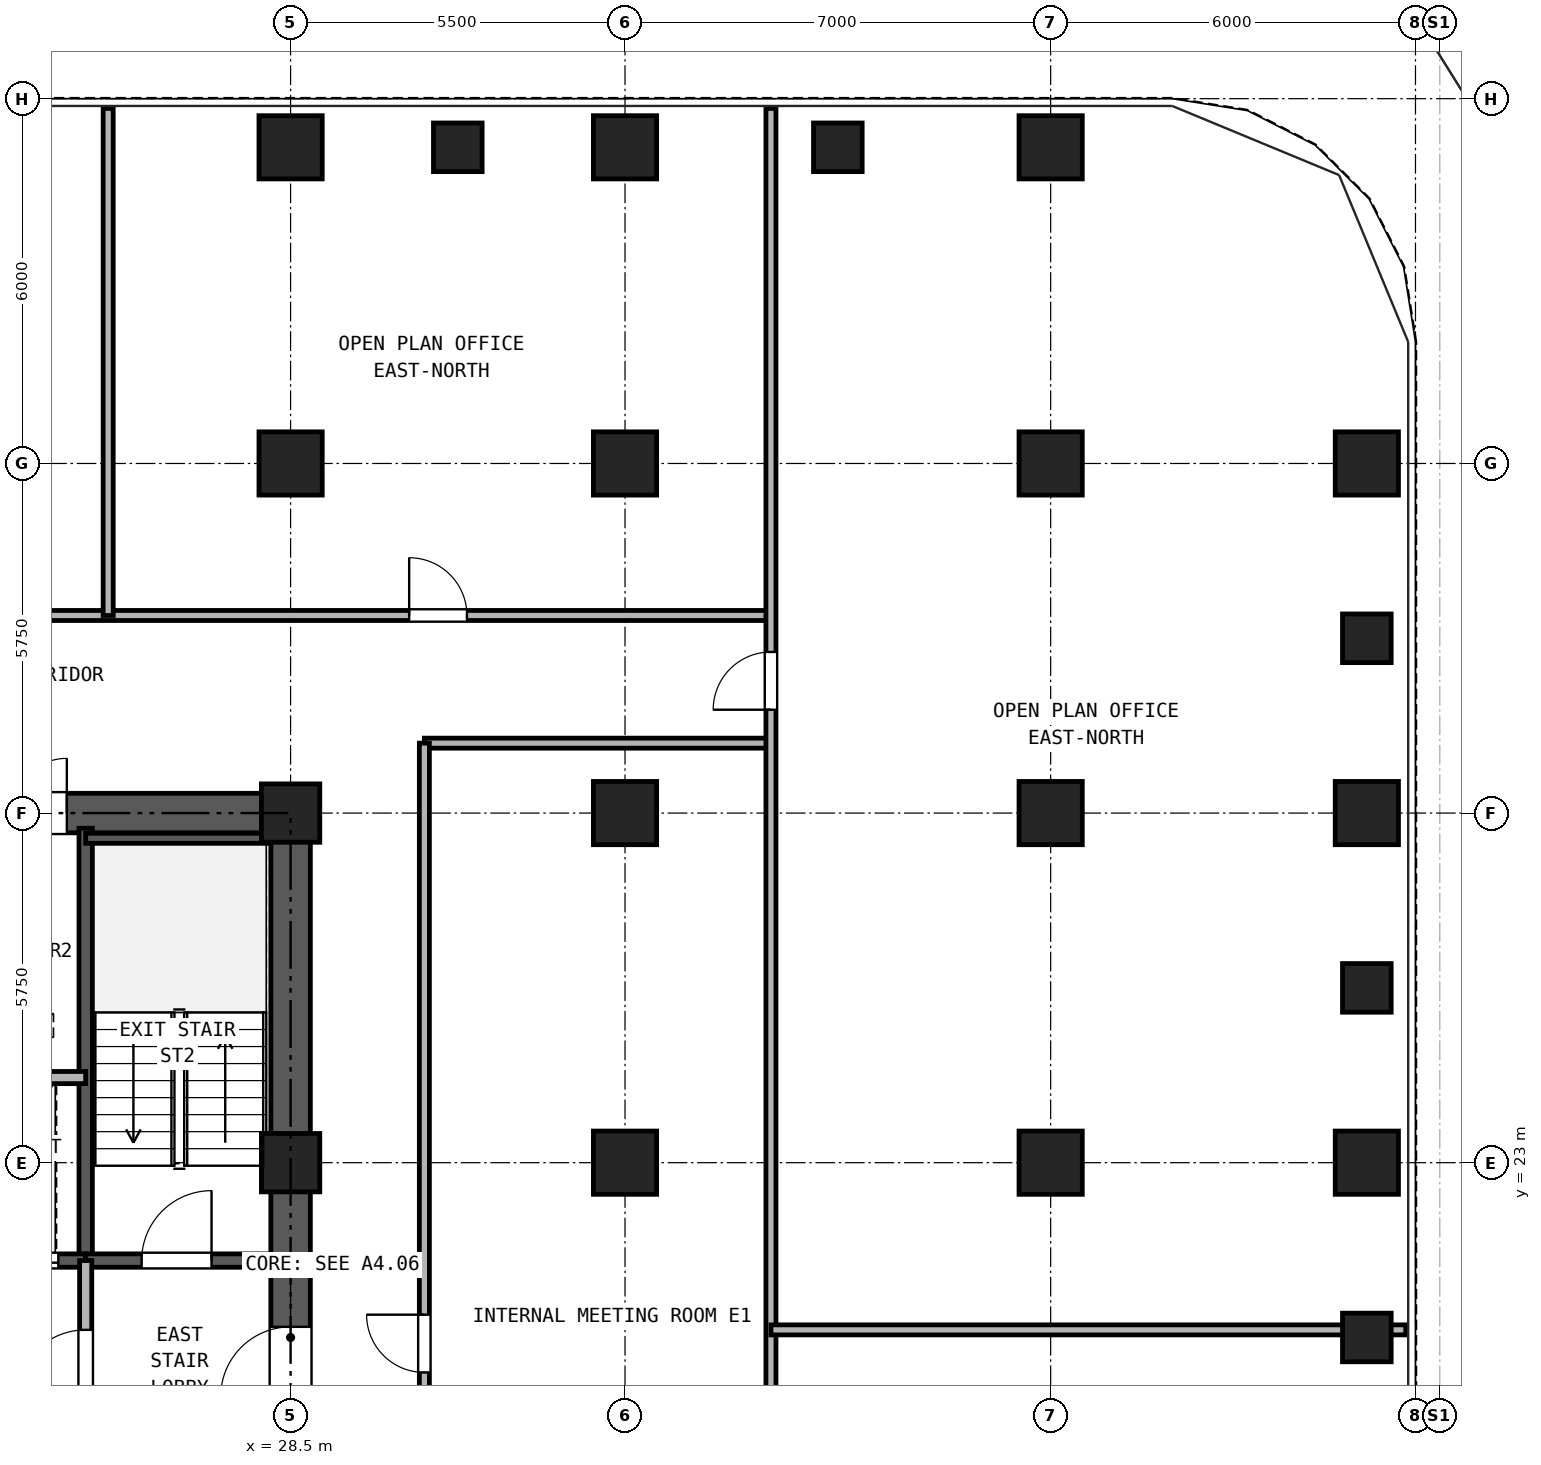
"""IFC4 building model, lengths in metres.
Left out: names, types, materials, properties, quantities, classifications, styles, units other than length and angle.
Written with IfcOpenShell. Run it as: python <this file> out.ifc"""

import sys

from ifc_helpers import new_model, si_unit, direction, frame, frame_2d, origin, origin_2d, place, context, subcontext, project, spatial, rectangle, hollow_rectangle, extrude, source, transform, mapped, element, fill, save


model = new_model("IFC4")
c1 = context("Model", 3, precision=1e-05, world=origin(), true_north=direction((0.0, 1.0)))
c2 = subcontext(c1, "Body", "Model", "MODEL_VIEW")
j1 = project(units=[si_unit("LENGTHUNIT", "METRE"), si_unit("PLANEANGLEUNIT", "RADIAN")], contexts=[c1])
p1 = place(None, origin())
s1 = spatial("IfcSite", under=j1, at=p1, CompositionType="ELEMENT")
p2 = place(p1, origin())
s2 = spatial("IfcBuilding", under=s1, at=p2, CompositionType="ELEMENT")
p3 = place(p2, frame((0.0, 0.0, 47.7)))
s3 = spatial("IfcBuildingStorey", under=s2, at=p3, CompositionType="ELEMENT", Elevation=47.7)
m1 = source(origin(), c2, "Body", "SweptSolid", [
    extrude(hollow_rectangle(XDim=1.04, YDim=1.04, WallThickness=0.065, at=origin_2d()), origin(), (0.0, 0.0, 1.0), 3.32),
])
for number, where, z_axis, x_axis in (
    (1, (28.5, 39.7, 0.0), (0.0, 0.0, 1.0), (1.0, 0.0, 0.0)),
    (2, (34.0, 39.7, 0.0), (0.0, 0.0, 1.0), (1.0, 0.0, 0.0)),
    (3, (41.0, 39.7, 0.0), (0.0, 0.0, 1.0), (1.0, 0.0, 0.0)),
    (4, (46.2, 23.0, 0.0), (0.0, 0.0, 1.0), (1.0, 0.0, 0.0)),
    (5, (46.2, 28.75, 0.0), (0.0, 0.0, 1.0), (1.0, 0.0, 0.0)),
    (6, (46.2, 34.5, 0.0), (0.0, 0.0, 1.0), (1.0, 0.0, 0.0)),
):
    element("IfcColumn", number, at=place(p3, frame(where, z_axis=z_axis, x_axis=x_axis)), inside=s3, PredefinedType="COLUMN", context=c2, shape_type="MappedRepresentation", body=[
        mapped(m1, transform((0.0, 0.0, 0.0), x_axis=(1.0, 0.0, 0.0), y_axis=(0.0, 1.0, 0.0), z_axis=(0.0, 0.0, 1.0), scale=1.0)),
    ])
m2 = source(origin(), c2, "Body", "SweptSolid", [
    extrude(hollow_rectangle(XDim=0.96, YDim=0.96, WallThickness=0.06, at=origin_2d()), origin(), (0.0, 0.0, 1.0), 3.32),
])
for number, where, z_axis, x_axis in (
    (7, (28.5, 23.0, 0.0), (0.0, 0.0, 1.0), (1.0, 0.0, 0.0)),
    (8, (28.5, 28.75, 0.0), (0.0, 0.0, 1.0), (1.0, 0.0, 0.0)),
):
    element("IfcColumn", number, at=place(p3, frame(where, z_axis=z_axis, x_axis=x_axis)), inside=s3, PredefinedType="COLUMN", context=c2, shape_type="MappedRepresentation", body=[
        mapped(m2, transform((0.0, 0.0, 0.0), x_axis=(1.0, 0.0, 0.0), y_axis=(0.0, 1.0, 0.0), z_axis=(0.0, 0.0, 1.0), scale=1.0)),
    ])
for number, where, z_axis, x_axis in (
    (9, (28.5, 34.5, 0.0), (0.0, 0.0, 1.0), (1.0, 0.0, 0.0)),
    (10, (34.0, 23.0, 0.0), (0.0, 0.0, 1.0), (1.0, 0.0, 0.0)),
    (11, (34.0, 28.75, 0.0), (0.0, 0.0, 1.0), (1.0, 0.0, 0.0)),
    (12, (34.0, 34.5, 0.0), (0.0, 0.0, 1.0), (1.0, 0.0, 0.0)),
    (13, (41.0, 23.0, 0.0), (0.0, 0.0, 1.0), (1.0, 0.0, 0.0)),
    (14, (41.0, 28.75, 0.0), (0.0, 0.0, 1.0), (1.0, 0.0, 0.0)),
    (15, (41.0, 34.5, 0.0), (0.0, 0.0, 1.0), (1.0, 0.0, 0.0)),
):
    element("IfcColumn", number, at=place(p3, frame(where, z_axis=z_axis, x_axis=x_axis)), inside=s3, PredefinedType="COLUMN", context=c2, shape_type="MappedRepresentation", body=[
        mapped(m1, transform((0.0, 0.0, 0.0), x_axis=(1.0, 0.0, 0.0), y_axis=(0.0, 1.0, 0.0), z_axis=(0.0, 0.0, 1.0), scale=1.0)),
    ])
m3 = source(origin(), c2, "Body", "SweptSolid", [
    extrude(hollow_rectangle(XDim=0.8, YDim=0.8, WallThickness=0.045, at=origin_2d()), origin(), (0.0, 0.0, 1.0), 3.32),
])
for number, where, z_axis, x_axis in (
    (16, (31.25, 39.7, 0.0), (0.0, 0.0, 1.0), (1.0, 0.0, 0.0)),
    (17, (37.5, 39.7, 0.0), (0.0, 0.0, 1.0), (1.0, 0.0, 0.0)),
    (18, (46.2, 20.125, 0.0), (0.0, 0.0, 1.0), (1.0, 0.0, 0.0)),
    (19, (46.2, 25.875, 0.0), (0.0, 0.0, 1.0), (1.0, 0.0, 0.0)),
    (20, (46.2, 31.625, 0.0), (0.0, 0.0, 1.0), (1.0, 0.0, 0.0)),
):
    element("IfcColumn", number, at=place(p3, frame(where, z_axis=z_axis, x_axis=x_axis)), inside=s3, PredefinedType="COLUMN", context=c2, shape_type="MappedRepresentation", body=[
        mapped(m3, transform((0.0, 0.0, 0.0), x_axis=(1.0, 0.0, 0.0), y_axis=(0.0, 1.0, 0.0), z_axis=(0.0, 0.0, 1.0), scale=1.0)),
    ])
p4 = place(p3, frame((18.175, 28.75, 0.0), z_axis=(0.0, 0.0, 1.0), x_axis=(1.0, 0.0, 0.0)))
e21 = element("IfcWall", 21, at=p4, inside=s3, PredefinedType="SHEAR", context=c2, shape_type="SweptSolid", body=[
    extrude(rectangle(XDim=10.65, YDim=0.65, at=frame_2d((5.325, 0.0))), origin(), (0.0, 0.0, 1.0), 3.32),
])
p5 = place(p4, frame((4.205, 0.0, 0.0)))
e22 = element("IfcOpeningElement", 22, at=p5, cuts=e21, PredefinedType="OPENING", context=c2, shape_type="SweptSolid", body=[
    extrude(rectangle(XDim=0.9, YDim=2.05, at=frame_2d((0.45, 1.025))), frame((0.0, 0.335, 0.0), z_axis=(0.0, -1.0, 0.0), x_axis=(1.0, 0.0, 0.0)), (0.0, 0.0, 1.0), 0.67),
])
p6 = place(p4, frame((5.745, 0.0, 0.0)))
e23 = element("IfcOpeningElement", 23, at=p6, cuts=e21, PredefinedType="OPENING", context=c2, shape_type="SweptSolid", body=[
    extrude(rectangle(XDim=0.9, YDim=2.05, at=frame_2d((0.45, 1.025))), frame((0.0, 0.335, 0.0), z_axis=(0.0, -1.0, 0.0), x_axis=(1.0, 0.0, 0.0)), (0.0, 0.0, 1.0), 0.67),
])
p7 = place(p3, frame((28.5, 11.825, 0.0), z_axis=(0.0, 0.0, 1.0), x_axis=(0.0, 1.0, 0.0)))
e24 = element("IfcWall", 24, at=p7, inside=s3, PredefinedType="SHEAR", context=c2, shape_type="SweptSolid", body=[
    extrude(rectangle(XDim=16.6, YDim=0.65, at=frame_2d((8.3, 0.0))), origin(), (0.0, 0.0, 1.0), 3.32),
])
p8 = place(p7, frame((7.325, 0.0, 0.0)))
e25 = element("IfcOpeningElement", 25, at=p8, cuts=e24, PredefinedType="OPENING", context=c2, shape_type="SweptSolid", body=[
    extrude(rectangle(XDim=1.15, YDim=2.2, at=frame_2d((0.575, 1.1))), frame((0.0, 0.335, 0.0), z_axis=(0.0, -1.0, 0.0), x_axis=(1.0, 0.0, 0.0)), (0.0, 0.0, 1.0), 0.67),
])
p9 = place(p3, frame((25.13, 21.39, 0.0), z_axis=(0.0, 0.0, 1.0), x_axis=(0.0, 1.0, 0.0)))
e26 = element("IfcWall", 26, at=p9, inside=s3, PredefinedType="SOLIDWALL", context=c2, shape_type="SweptSolid", body=[
    extrude(rectangle(XDim=7.11, YDim=0.22, at=frame_2d((3.555, 0.0))), origin(), (0.0, 0.0, 1.0), 3.32),
])
p10 = place(p3, frame((25.13, 28.335, 0.0), z_axis=(0.0, 0.0, 1.0), x_axis=(1.0, 0.0, 0.0)))
e27 = element("IfcWall", 27, at=p10, inside=s3, PredefinedType="PARTITIONING", context=c2, shape_type="SweptSolid", body=[
    extrude(rectangle(XDim=3.035, YDim=0.165, at=frame_2d((1.518, 0.0))), origin(), (0.0, 0.0, 1.0), 3.32),
])
p11 = place(p3, frame((18.835, 21.39, 0.0), z_axis=(0.0, 0.0, 1.0), x_axis=(1.0, 0.0, 0.0)))
e28 = element("IfcWall", 28, at=p11, inside=s3, PredefinedType="SOLIDWALL", context=c2, shape_type="SweptSolid", body=[
    extrude(rectangle(XDim=6.295, YDim=0.22, at=frame_2d((3.147, 0.0))), origin(), (0.0, 0.0, 1.0), 3.32),
])
p12 = place(p11, frame((1.015, 0.0, 0.0)))
e29 = element("IfcOpeningElement", 29, at=p12, cuts=e28, PredefinedType="OPENING", context=c2, shape_type="SweptSolid", body=[
    extrude(rectangle(XDim=1.15, YDim=2.2, at=frame_2d((0.575, 1.1))), frame((0.0, 0.12, 0.0), z_axis=(0.0, -1.0, 0.0), x_axis=(1.0, 0.0, 0.0)), (0.0, 0.0, 1.0), 0.24),
])
p13 = place(p11, frame((4.745, 0.0, 0.0)))
e30 = element("IfcOpeningElement", 30, at=p13, cuts=e28, PredefinedType="OPENING", context=c2, shape_type="SweptSolid", body=[
    extrude(rectangle(XDim=1.1, YDim=2.25, at=frame_2d((0.55, 1.125))), frame((0.0, 0.12, 0.0), z_axis=(0.0, -1.0, 0.0), x_axis=(1.0, 0.0, 0.0)), (0.0, 0.0, 1.0), 0.24),
])
p14 = place(p3, frame((25.13, 21.39, 0.0), z_axis=(0.0, 0.0, 1.0), x_axis=(1.0, 0.0, 0.0)))
e31 = element("IfcWall", 31, at=p14, inside=s3, PredefinedType="SOLIDWALL", context=c2, shape_type="SweptSolid", body=[
    extrude(rectangle(XDim=3.035, YDim=0.22, at=frame_2d((1.518, 0.0))), origin(), (0.0, 0.0, 1.0), 3.32),
])
p15 = place(p14, frame((0.92, 0.0, 0.0)))
e32 = element("IfcOpeningElement", 32, at=p15, cuts=e31, PredefinedType="OPENING", context=c2, shape_type="SweptSolid", body=[
    extrude(rectangle(XDim=1.15, YDim=2.2, at=frame_2d((0.575, 1.1))), frame((0.0, 0.12, 0.0), z_axis=(0.0, -1.0, 0.0), x_axis=(1.0, 0.0, 0.0)), (0.0, 0.0, 1.0), 0.24),
])
p16 = place(p3, frame((22.11, 24.4, 0.0), z_axis=(0.0, 0.0, 1.0), x_axis=(1.0, 0.0, 0.0)))
e33 = element("IfcWall", 33, at=p16, inside=s3, PredefinedType="PARTITIONING", context=c2, shape_type="SweptSolid", body=[
    extrude(rectangle(XDim=3.02, YDim=0.2, at=frame_2d((1.51, 0.0))), origin(), (0.0, 0.0, 1.0), 3.32),
])
p17 = place(p3, frame((25.13, 18.0, 0.0), z_axis=(0.0, 0.0, 1.0), x_axis=(0.0, 1.0, 0.0)))
e34 = element("IfcWall", 34, at=p17, inside=s3, PredefinedType="PARTITIONING", context=c2, shape_type="SweptSolid", body=[
    extrude(rectangle(XDim=3.39, YDim=0.2, at=frame_2d((1.695, 0.0))), origin(), (0.0, 0.0, 1.0), 3.32),
])
p18 = place(p17, frame((1.1, 0.0, 0.0)))
e35 = element("IfcOpeningElement", 35, at=p18, cuts=e34, PredefinedType="OPENING", context=c2, shape_type="SweptSolid", body=[
    extrude(rectangle(XDim=1.15, YDim=2.2, at=frame_2d((0.575, 1.1))), frame((0.0, 0.11, 0.0), z_axis=(0.0, -1.0, 0.0), x_axis=(1.0, 0.0, 0.0)), (0.0, 0.0, 1.0), 0.22),
])
p19 = place(p3, frame((10.6, 32.0, 0.0), z_axis=(0.0, 0.0, 1.0), x_axis=(1.0, 0.0, 0.0)))
e36 = element("IfcWall", 36, at=p19, inside=s3, PredefinedType="PARTITIONING", context=c2, shape_type="SweptSolid", body=[
    extrude(rectangle(XDim=25.8, YDim=0.165, at=frame_2d((12.9, 0.0))), origin(), (0.0, 0.0, 1.0), 3.32),
])
p20 = place(p19, frame((3.45, 0.0, 0.0)))
e37 = element("IfcOpeningElement", 37, at=p20, cuts=e36, PredefinedType="OPENING", context=c2, shape_type="SweptSolid", body=[
    extrude(rectangle(XDim=0.95, YDim=2.15, at=frame_2d((0.475, 1.075))), frame((0.0, 0.093, 0.0), z_axis=(0.0, -1.0, 0.0), x_axis=(1.0, 0.0, 0.0)), (0.0, 0.0, 1.0), 0.185),
])
p21 = place(p19, frame((10.9, 0.0, 0.0)))
e38 = element("IfcOpeningElement", 38, at=p21, cuts=e36, PredefinedType="OPENING", context=c2, shape_type="SweptSolid", body=[
    extrude(rectangle(XDim=0.95, YDim=2.15, at=frame_2d((0.475, 1.075))), frame((0.0, 0.093, 0.0), z_axis=(0.0, -1.0, 0.0), x_axis=(1.0, 0.0, 0.0)), (0.0, 0.0, 1.0), 0.185),
])
p22 = place(p19, frame((19.85, 0.0, 0.0)))
e39 = element("IfcOpeningElement", 39, at=p22, cuts=e36, PredefinedType="OPENING", context=c2, shape_type="SweptSolid", body=[
    extrude(rectangle(XDim=0.95, YDim=2.15, at=frame_2d((0.475, 1.075))), frame((0.0, 0.093, 0.0), z_axis=(0.0, -1.0, 0.0), x_axis=(1.0, 0.0, 0.0)), (0.0, 0.0, 1.0), 0.185),
])
p23 = place(p3, frame((30.7, 29.9, 0.0), z_axis=(0.0, 0.0, 1.0), x_axis=(1.0, 0.0, 0.0)))
e40 = element("IfcWall", 40, at=p23, inside=s3, PredefinedType="PARTITIONING", context=c2, shape_type="SweptSolid", body=[
    extrude(rectangle(XDim=5.7, YDim=0.165, at=frame_2d((2.85, 0.0))), origin(), (0.0, 0.0, 1.0), 3.32),
])
p24 = place(p3, frame((30.7, 10.2, 0.0), z_axis=(0.0, 0.0, 1.0), x_axis=(0.0, 1.0, 0.0)))
e41 = element("IfcWall", 41, at=p24, inside=s3, PredefinedType="PARTITIONING", context=c2, shape_type="SweptSolid", body=[
    extrude(rectangle(XDim=19.7, YDim=0.165, at=frame_2d((9.85, 0.0))), origin(), (0.0, 0.0, 1.0), 3.32),
])
p25 = place(p24, frame((9.35, 0.0, 0.0)))
e42 = element("IfcOpeningElement", 42, at=p25, cuts=e41, PredefinedType="OPENING", context=c2, shape_type="SweptSolid", body=[
    extrude(rectangle(XDim=0.95, YDim=2.15, at=frame_2d((0.475, 1.075))), frame((0.0, 0.093, 0.0), z_axis=(0.0, -1.0, 0.0), x_axis=(1.0, 0.0, 0.0)), (0.0, 0.0, 1.0), 0.185),
])
p26 = place(p3, frame((36.4, 0.16, 0.0), z_axis=(0.0, 0.0, 1.0), x_axis=(0.0, 1.0, 0.0)))
e43 = element("IfcWall", 43, at=p26, inside=s3, PredefinedType="PARTITIONING", context=c2, shape_type="SweptSolid", body=[
    extrude(rectangle(XDim=40.18, YDim=0.165, at=frame_2d((20.09, 0.0))), origin(), (0.0, 0.0, 1.0), 3.32),
])
p27 = place(p26, frame((8.49, 0.0, 0.0)))
e44 = element("IfcOpeningElement", 44, at=p27, cuts=e43, PredefinedType="OPENING", context=c2, shape_type="SweptSolid", body=[
    extrude(rectangle(XDim=0.95, YDim=2.15, at=frame_2d((0.475, 1.075))), frame((0.0, 0.093, 0.0), z_axis=(0.0, -1.0, 0.0), x_axis=(1.0, 0.0, 0.0)), (0.0, 0.0, 1.0), 0.185),
])
p28 = place(p26, frame((30.29, 0.0, 0.0)))
e45 = element("IfcOpeningElement", 45, at=p28, cuts=e43, PredefinedType="OPENING", context=c2, shape_type="SweptSolid", body=[
    extrude(rectangle(XDim=0.95, YDim=2.15, at=frame_2d((0.475, 1.075))), frame((0.0, 0.093, 0.0), z_axis=(0.0, -1.0, 0.0), x_axis=(1.0, 0.0, 0.0)), (0.0, 0.0, 1.0), 0.185),
])
p29 = place(p3, frame((25.5, 32.0, 0.0), z_axis=(0.0, 0.0, 1.0), x_axis=(0.0, 1.0, 0.0)))
e46 = element("IfcWall", 46, at=p29, inside=s3, PredefinedType="PARTITIONING", context=c2, shape_type="SweptSolid", body=[
    extrude(rectangle(XDim=8.34, YDim=0.165, at=frame_2d((4.17, 0.0))), origin(), (0.0, 0.0, 1.0), 3.32),
])
p30 = place(p3, frame((36.4, 20.25, 0.0), z_axis=(0.0, 0.0, 1.0), x_axis=(1.0, 0.0, 0.0)))
e47 = element("IfcWall", 47, at=p30, inside=s3, PredefinedType="PARTITIONING", context=c2, shape_type="SweptSolid", body=[
    extrude(rectangle(XDim=10.44, YDim=0.165, at=frame_2d((5.22, 0.0))), origin(), (0.0, 0.0, 1.0), 2.898),
])
p31 = place(p15, frame((1.15, 0.0, 0.0), z_axis=(0.0, 0.0, 1.0), x_axis=(-1.0, 0.0, 0.0)))
e48 = element("IfcDoor", 48, at=p31, inside=s3, OperationType="SINGLE_SWING_RIGHT", PredefinedType="DOOR", context=c2, shape_type="SweptSolid", body=[
    extrude(rectangle(XDim=1.15, YDim=2.2, at=frame_2d((0.575, 1.1))), frame((0.0, 0.025, 0.0), z_axis=(0.0, -1.0, 0.0), x_axis=(1.0, 0.0, 0.0)), (0.0, 0.0, 1.0), 0.05),
])
fill(e32, e48)
p32 = place(p13, frame((1.1, 0.0, 0.0), z_axis=(0.0, 0.0, 1.0), x_axis=(-1.0, 0.0, 0.0)))
e49 = element("IfcDoor", 49, at=p32, inside=s3, OperationType="DOUBLE_DOOR_SLIDING", PredefinedType="DOOR", context=c2, shape_type="SweptSolid", body=[
    extrude(rectangle(XDim=1.1, YDim=2.25, at=frame_2d((0.55, 1.125))), frame((0.0, 0.025, 0.0), z_axis=(0.0, -1.0, 0.0), x_axis=(1.0, 0.0, 0.0)), (0.0, 0.0, 1.0), 0.05),
])
fill(e30, e49)
p33 = place(p18, origin())
e50 = element("IfcDoor", 50, at=p33, inside=s3, OperationType="SINGLE_SWING_LEFT", PredefinedType="DOOR", context=c2, shape_type="SweptSolid", body=[
    extrude(rectangle(XDim=1.15, YDim=2.2, at=frame_2d((0.575, 1.1))), frame((0.0, 0.025, 0.0), z_axis=(0.0, -1.0, 0.0), x_axis=(1.0, 0.0, 0.0)), (0.0, 0.0, 1.0), 0.05),
])
fill(e35, e50)
p34 = place(p8, origin())
e51 = element("IfcDoor", 51, at=p34, inside=s3, OperationType="SINGLE_SWING_LEFT", PredefinedType="DOOR", context=c2, shape_type="SweptSolid", body=[
    extrude(rectangle(XDim=1.15, YDim=2.2, at=frame_2d((0.575, 1.1))), frame((0.0, 0.025, 0.0), z_axis=(0.0, -1.0, 0.0), x_axis=(1.0, 0.0, 0.0)), (0.0, 0.0, 1.0), 0.05),
])
fill(e25, e51)
p35 = place(p6, origin())
e52 = element("IfcDoor", 52, at=p35, inside=s3, OperationType="SINGLE_SWING_RIGHT", PredefinedType="DOOR", context=c2, shape_type="SweptSolid", body=[
    extrude(rectangle(XDim=0.9, YDim=2.05, at=frame_2d((0.45, 1.025))), frame((0.0, 0.025, 0.0), z_axis=(0.0, -1.0, 0.0), x_axis=(1.0, 0.0, 0.0)), (0.0, 0.0, 1.0), 0.05),
])
fill(e23, e52)
p36 = place(p22, origin())
e53 = element("IfcDoor", 53, at=p36, inside=s3, OperationType="SINGLE_SWING_LEFT", PredefinedType="DOOR", context=c2, shape_type="SweptSolid", body=[
    extrude(rectangle(XDim=0.95, YDim=2.15, at=frame_2d((0.475, 1.075))), frame((0.0, 0.025, 0.0), z_axis=(0.0, -1.0, 0.0), x_axis=(1.0, 0.0, 0.0)), (0.0, 0.0, 1.0), 0.05),
])
fill(e39, e53)
p37 = place(p28, origin())
e54 = element("IfcDoor", 54, at=p37, inside=s3, OperationType="SINGLE_SWING_LEFT", PredefinedType="DOOR", context=c2, shape_type="SweptSolid", body=[
    extrude(rectangle(XDim=0.95, YDim=2.15, at=frame_2d((0.475, 1.075))), frame((0.0, 0.025, 0.0), z_axis=(0.0, -1.0, 0.0), x_axis=(1.0, 0.0, 0.0)), (0.0, 0.0, 1.0), 0.05),
])
fill(e45, e54)
p38 = place(p25, origin())
e55 = element("IfcDoor", 55, at=p38, inside=s3, OperationType="SINGLE_SWING_RIGHT", PredefinedType="DOOR", context=c2, shape_type="SweptSolid", body=[
    extrude(rectangle(XDim=0.95, YDim=2.15, at=frame_2d((0.475, 1.075))), frame((0.0, 0.025, 0.0), z_axis=(0.0, -1.0, 0.0), x_axis=(1.0, 0.0, 0.0)), (0.0, 0.0, 1.0), 0.05),
])
fill(e42, e55)
save(model, sys.argv[1])
